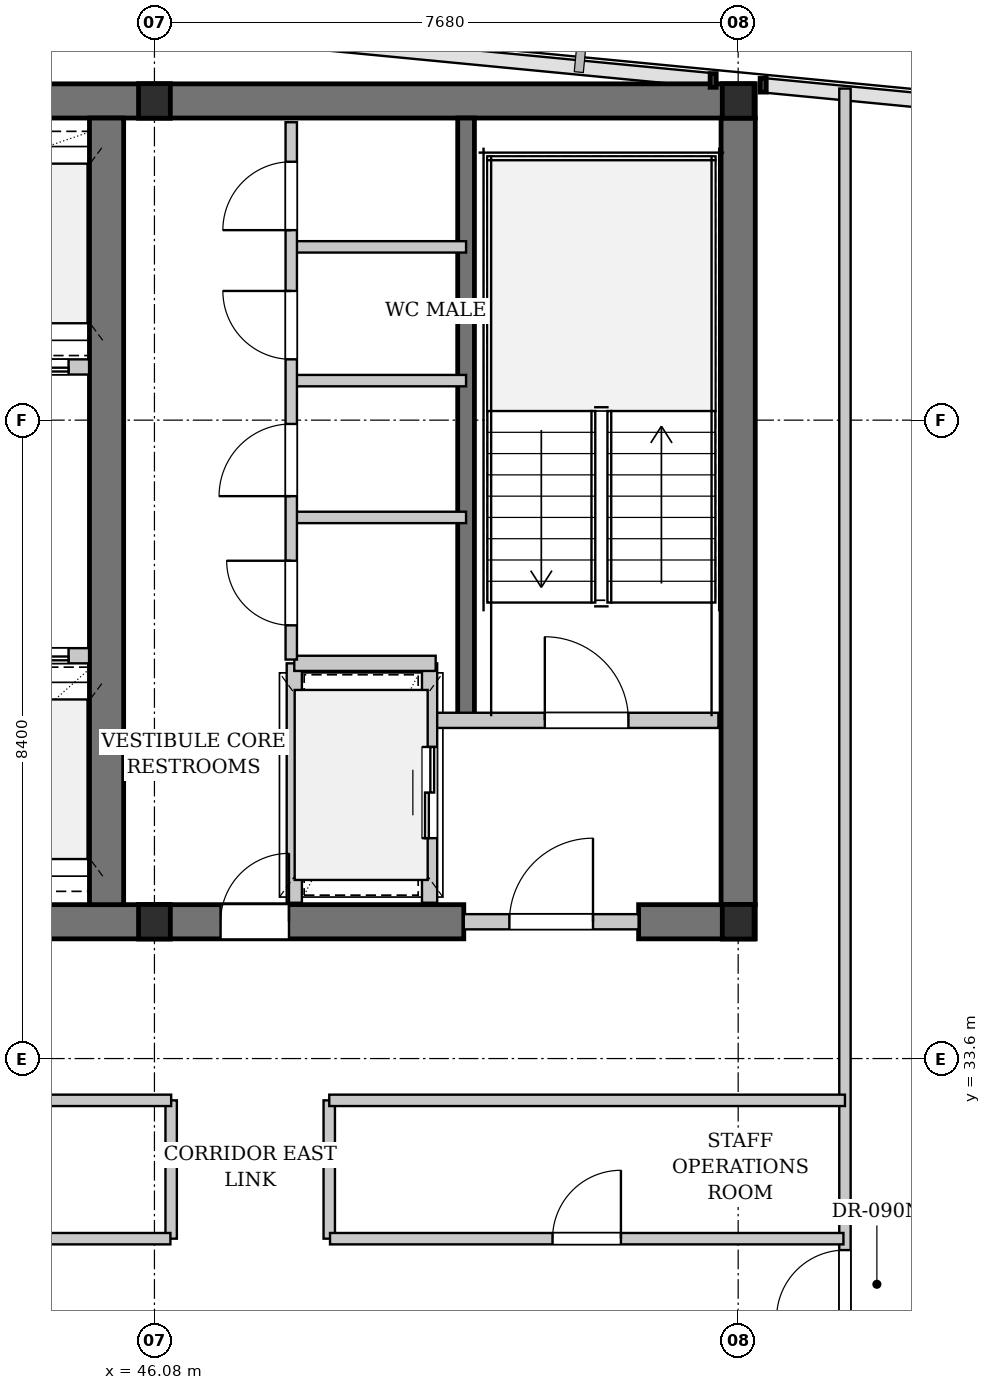
"""IFC4 building model, lengths in metres.
Left out: names, types, materials, properties, quantities, classifications, styles, units other than length and angle.
Written with IfcOpenShell. Run it as: python <this file> out.ifc"""

import sys

from ifc_helpers import new_model, si_unit, direction, frame, frame_2d, origin, origin_2d, place, context, subcontext, project, spatial, rectangle, i_section, extrude, element, fill, save


model = new_model("IFC4")
c1 = context("Model", 3, precision=1e-05, world=origin(), true_north=direction((0.0, 1.0)))
c2 = subcontext(c1, "Body", "Model", "MODEL_VIEW")
j1 = project(units=[si_unit("LENGTHUNIT", "METRE"), si_unit("PLANEANGLEUNIT", "RADIAN")], contexts=[c1])
p1 = place(None, origin())
s1 = spatial("IfcSite", under=j1, at=p1, CompositionType="ELEMENT")
p2 = place(p1, origin())
s2 = spatial("IfcBuilding", under=s1, at=p2, CompositionType="ELEMENT")
p3 = place(p2, frame((0.0, 0.0, 178.7)))
s3 = spatial("IfcBuildingStorey", under=s2, at=p3, CompositionType="ELEMENT", Elevation=178.7)
p4 = place(p3, frame((22.815, 46.2, 0.0), z_axis=(0.0, 0.0, 1.0), x_axis=(1.0, 0.0, 0.0)))
e1 = element("IfcWall", 1, at=p4, inside=s3, PredefinedType="SHEAR", context=c2, shape_type="SweptSolid", body=[
    extrude(rectangle(XDim=31.17, YDim=0.45, at=frame_2d((15.585, 0.0))), origin(), (0.0, 0.0, 1.0), 3.08),
])
p5 = place(p3, frame((42.1, 35.4, 0.0), z_axis=(0.0, 0.0, 1.0), x_axis=(1.0, 0.0, 0.0)))
e2 = element("IfcWall", 2, at=p5, inside=s3, PredefinedType="SHEAR", context=c2, shape_type="SweptSolid", body=[
    extrude(rectangle(XDim=8.05, YDim=0.45, at=frame_2d((4.025, 0.0))), origin(), (0.0, 0.0, 1.0), 3.08),
])
p6 = place(p5, frame((4.85, 0.0, 0.0)))
e3 = element("IfcOpeningElement", 3, at=p6, cuts=e2, PredefinedType="OPENING", context=c2, shape_type="SweptSolid", body=[
    extrude(rectangle(XDim=0.9, YDim=2.15, at=frame_2d((0.45, 1.075))), frame((0.0, 0.235, 0.0), z_axis=(0.0, -1.0, 0.0), x_axis=(1.0, 0.0, 0.0)), (0.0, 0.0, 1.0), 0.47),
])
p7 = place(p3, frame((52.45, 35.4, 0.0), z_axis=(0.0, 0.0, 1.0), x_axis=(1.0, 0.0, 0.0)))
e4 = element("IfcWall", 4, at=p7, inside=s3, PredefinedType="SHEAR", context=c2, shape_type="SweptSolid", body=[
    extrude(rectangle(XDim=1.535, YDim=0.45, at=frame_2d((0.768, 0.0))), origin(), (0.0, 0.0, 1.0), 3.08),
])
for number, where, z_axis, x_axis in (
    (5, (45.45, 35.625, 0.0), (0.0, 0.0, 1.0), (0.0, 1.0, 0.0)),
    (6, (53.76, 35.625, 0.0), (0.0, 0.0, 1.0), (0.0, 1.0, 0.0)),
):
    element("IfcWall", number, at=place(p3, frame(where, z_axis=z_axis, x_axis=x_axis)), inside=s3, PredefinedType="SHEAR", context=c2, shape_type="SweptSolid", body=[
        extrude(rectangle(XDim=10.35, YDim=0.45, at=frame_2d((5.175, 0.0))), origin(), (0.0, 0.0, 1.0), 3.08),
    ])
p8 = place(p3, frame((50.18, 38.05, 0.0), z_axis=(0.0, 0.0, 1.0), x_axis=(0.0, 1.0, 0.0)))
e7 = element("IfcWall", 7, at=p8, inside=s3, PredefinedType="SHEAR", context=c2, shape_type="SweptSolid", body=[
    extrude(rectangle(XDim=7.925, YDim=0.22, at=frame_2d((3.962, 0.0))), origin(), (0.0, 0.0, 1.0), 3.08),
])
for number, where, z_axis, x_axis in (
    (8, (46.08, 35.4, 0.0), (0.0, 0.0, 1.0), (1.0, 0.0, 0.0)),
    (9, (46.08, 46.2, 0.0), (0.0, 0.0, 1.0), (1.0, 0.0, 0.0)),
    (10, (53.76, 35.4, 0.0), (0.0, 0.0, 1.0), (1.0, 0.0, 0.0)),
    (11, (53.76, 46.2, 0.0), (0.0, 0.0, 1.0), (1.0, 0.0, 0.0)),
):
    element("IfcColumn", number, at=place(p3, frame(where, z_axis=z_axis, x_axis=x_axis)), inside=s3, PredefinedType="COLUMN", context=c2, shape_type="SweptSolid", body=[
        extrude(i_section(OverallWidth=0.418, OverallDepth=0.455, WebThickness=0.042, FlangeThickness=0.068, FilletRadius=0.015, at=origin_2d()), origin(), (0.0, 0.0, 1.0), 3.3),
    ])
p9 = place(p3, frame((41.85, 38.9, 0.0), z_axis=(0.0, 0.0, 1.0), x_axis=(1.0, 0.0, 0.0)))
e12 = element("IfcWall", 12, at=p9, inside=s3, PredefinedType="PARTITIONING", context=c2, shape_type="SweptSolid", body=[
    extrude(rectangle(XDim=3.37, YDim=0.2, at=frame_2d((1.685, 0.0))), origin(), (0.0, 0.0, 1.0), 3.08),
])
p10 = place(p9, frame((0.4, 0.0, 0.0)))
e13 = element("IfcOpeningElement", 13, at=p10, cuts=e12, PredefinedType="OPENING", context=c2, shape_type="SweptSolid", body=[
    extrude(rectangle(XDim=1.0, YDim=2.2, at=frame_2d((0.5, 1.1))), frame((0.0, 0.11, 0.0), z_axis=(0.0, -1.0, 0.0), x_axis=(1.0, 0.0, 0.0)), (0.0, 0.0, 1.0), 0.22),
])
p11 = place(p9, frame((2.1, 0.0, 0.0)))
e14 = element("IfcOpeningElement", 14, at=p11, cuts=e12, PredefinedType="OPENING", context=c2, shape_type="SweptSolid", body=[
    extrude(rectangle(XDim=1.0, YDim=2.2, at=frame_2d((0.5, 1.1))), frame((0.0, 0.11, 0.0), z_axis=(0.0, -1.0, 0.0), x_axis=(1.0, 0.0, 0.0)), (0.0, 0.0, 1.0), 0.22),
])
p12 = place(p3, frame((41.85, 42.7, 0.0), z_axis=(0.0, 0.0, 1.0), x_axis=(1.0, 0.0, 0.0)))
e15 = element("IfcWall", 15, at=p12, inside=s3, PredefinedType="PARTITIONING", context=c2, shape_type="SweptSolid", body=[
    extrude(rectangle(XDim=3.37, YDim=0.2, at=frame_2d((1.685, 0.0))), origin(), (0.0, 0.0, 1.0), 3.08),
])
p13 = place(p12, frame((0.4, 0.0, 0.0)))
e16 = element("IfcOpeningElement", 16, at=p13, cuts=e15, PredefinedType="OPENING", context=c2, shape_type="SweptSolid", body=[
    extrude(rectangle(XDim=1.0, YDim=2.2, at=frame_2d((0.5, 1.1))), frame((0.0, 0.11, 0.0), z_axis=(0.0, -1.0, 0.0), x_axis=(1.0, 0.0, 0.0)), (0.0, 0.0, 1.0), 0.22),
])
p14 = place(p12, frame((2.1, 0.0, 0.0)))
e17 = element("IfcOpeningElement", 17, at=p14, cuts=e15, PredefinedType="OPENING", context=c2, shape_type="SweptSolid", body=[
    extrude(rectangle(XDim=1.0, YDim=2.2, at=frame_2d((0.5, 1.1))), frame((0.0, 0.11, 0.0), z_axis=(0.0, -1.0, 0.0), x_axis=(1.0, 0.0, 0.0)), (0.0, 0.0, 1.0), 0.22),
])
p15 = place(p3, frame((49.78, 38.05, 0.0), z_axis=(0.0, 0.0, 1.0), x_axis=(1.0, 0.0, 0.0)))
e18 = element("IfcWall", 18, at=p15, inside=s3, PredefinedType="PARTITIONING", context=c2, shape_type="SweptSolid", body=[
    extrude(rectangle(XDim=3.72, YDim=0.2, at=frame_2d((1.86, 0.0))), origin(), (0.0, 0.0, 1.0), 3.08),
])
p16 = place(p15, frame((1.436, 0.0, 0.0)))
e19 = element("IfcOpeningElement", 19, at=p16, cuts=e18, PredefinedType="OPENING", context=c2, shape_type="SweptSolid", body=[
    extrude(rectangle(XDim=1.1, YDim=2.15, at=frame_2d((0.55, 1.075))), frame((0.0, 0.11, 0.0), z_axis=(0.0, -1.0, 0.0), x_axis=(1.0, 0.0, 0.0)), (0.0, 0.0, 1.0), 0.22),
])
p17 = place(p3, frame((50.15, 35.4, 0.0), z_axis=(0.0, 0.0, 1.0), x_axis=(1.0, 0.0, 0.0)))
e20 = element("IfcWall", 20, at=p17, inside=s3, PredefinedType="PARTITIONING", context=c2, shape_type="SweptSolid", body=[
    extrude(rectangle(XDim=2.3, YDim=0.2, at=frame_2d((1.15, 0.0))), origin(), (0.0, 0.0, 1.0), 2.475),
])
p18 = place(p17, frame((0.6, 0.0, 0.0)))
e21 = element("IfcOpeningElement", 21, at=p18, cuts=e20, PredefinedType="OPENING", context=c2, shape_type="SweptSolid", body=[
    extrude(rectangle(XDim=1.1, YDim=2.15, at=frame_2d((0.55, 1.075))), frame((0.0, 0.11, 0.0), z_axis=(0.0, -1.0, 0.0), x_axis=(1.0, 0.0, 0.0)), (0.0, 0.0, 1.0), 0.22),
])
p19 = place(p3, frame((49.7, 35.65, 0.0), z_axis=(0.0, 0.0, 1.0), x_axis=(0.0, 1.0, 0.0)))
e22 = element("IfcWall", 22, at=p19, inside=s3, PredefinedType="PARTITIONING", context=c2, shape_type="SweptSolid", body=[
    extrude(rectangle(XDim=3.15, YDim=0.2, at=frame_2d((1.575, 0.0))), origin(), (0.0, 0.0, 1.0), 3.08),
])
p20 = place(p19, frame((0.85, 0.0, 0.0)))
e23 = element("IfcOpeningElement", 23, at=p20, cuts=e22, PredefinedType="OPENING", context=c2, shape_type="SweptSolid", body=[
    extrude(rectangle(XDim=1.2, YDim=2.2, at=frame_2d((0.6, 1.1))), frame((0.0, 0.11, 0.0), z_axis=(0.0, -1.0, 0.0), x_axis=(1.0, 0.0, 0.0)), (0.0, 0.0, 1.0), 0.22),
])
p21 = place(p3, frame((47.92, 35.65, 0.0), z_axis=(0.0, 0.0, 1.0), x_axis=(0.0, 1.0, 0.0)))
e24 = element("IfcWall", 24, at=p21, inside=s3, PredefinedType="PARTITIONING", context=c2, shape_type="SweptSolid", body=[
    extrude(rectangle(XDim=3.15, YDim=0.2, at=frame_2d((1.575, 0.0))), origin(), (0.0, 0.0, 1.0), 3.08),
])
p22 = place(p3, frame((47.92, 38.8, 0.0), z_axis=(0.0, 0.0, 1.0), x_axis=(1.0, 0.0, 0.0)))
e25 = element("IfcWall", 25, at=p22, inside=s3, PredefinedType="PARTITIONING", context=c2, shape_type="SweptSolid", body=[
    extrude(rectangle(XDim=1.86, YDim=0.2, at=frame_2d((0.93, 0.0))), origin(), (0.0, 0.0, 1.0), 3.08),
])
for number, where, z_axis, x_axis in (
    (26, (47.88, 40.72, 0.0), (0.0, 0.0, 1.0), (1.0, 0.0, 0.0)),
    (27, (47.88, 42.52, 0.0), (0.0, 0.0, 1.0), (1.0, 0.0, 0.0)),
    (28, (47.88, 44.28, 0.0), (0.0, 0.0, 1.0), (1.0, 0.0, 0.0)),
):
    element("IfcWall", number, at=place(p3, frame(where, z_axis=z_axis, x_axis=x_axis)), inside=s3, PredefinedType="PARTITIONING", context=c2, shape_type="SweptSolid", body=[
        extrude(rectangle(XDim=2.3, YDim=0.15, at=frame_2d((1.15, 0.0))), origin(), (0.0, 0.0, 1.0), 3.08),
    ])
p23 = place(p3, frame((47.88, 38.85, 0.0), z_axis=(0.0, 0.0, 1.0), x_axis=(0.0, 1.0, 0.0)))
e29 = element("IfcWall", 29, at=p23, inside=s3, PredefinedType="PARTITIONING", context=c2, shape_type="SweptSolid", body=[
    extrude(rectangle(XDim=7.07, YDim=0.15, at=frame_2d((3.535, 0.0))), origin(), (0.0, 0.0, 1.0), 3.08),
])
p24 = place(p23, frame((0.45, 0.0, 0.0)))
e30 = element("IfcOpeningElement", 30, at=p24, cuts=e29, PredefinedType="OPENING", context=c2, shape_type="SweptSolid", body=[
    extrude(rectangle(XDim=0.85, YDim=2.15, at=frame_2d((0.425, 1.075))), frame((0.0, 0.085, 0.0), z_axis=(0.0, -1.0, 0.0), x_axis=(1.0, 0.0, 0.0)), (0.0, 0.0, 1.0), 0.17),
])
p25 = place(p23, frame((2.15, 0.0, 0.0)))
e31 = element("IfcOpeningElement", 31, at=p25, cuts=e29, PredefinedType="OPENING", context=c2, shape_type="SweptSolid", body=[
    extrude(rectangle(XDim=0.95, YDim=2.15, at=frame_2d((0.475, 1.075))), frame((0.0, 0.085, 0.0), z_axis=(0.0, -1.0, 0.0), x_axis=(1.0, 0.0, 0.0)), (0.0, 0.0, 1.0), 0.17),
])
p26 = place(p23, frame((3.95, 0.0, 0.0)))
e32 = element("IfcOpeningElement", 32, at=p26, cuts=e29, PredefinedType="OPENING", context=c2, shape_type="SweptSolid", body=[
    extrude(rectangle(XDim=0.9, YDim=2.15, at=frame_2d((0.45, 1.075))), frame((0.0, 0.085, 0.0), z_axis=(0.0, -1.0, 0.0), x_axis=(1.0, 0.0, 0.0)), (0.0, 0.0, 1.0), 0.17),
])
p27 = place(p23, frame((5.65, 0.0, 0.0)))
e33 = element("IfcOpeningElement", 33, at=p27, cuts=e29, PredefinedType="OPENING", context=c2, shape_type="SweptSolid", body=[
    extrude(rectangle(XDim=0.9, YDim=2.15, at=frame_2d((0.45, 1.075))), frame((0.0, 0.085, 0.0), z_axis=(0.0, -1.0, 0.0), x_axis=(1.0, 0.0, 0.0)), (0.0, 0.0, 1.0), 0.17),
])
p28 = place(p3, frame((55.165, 29.15, 0.0), z_axis=(0.0, 0.0, 1.0), x_axis=(0.0, 1.0, 0.0)))
e34 = element("IfcWall", 34, at=p28, inside=s3, PredefinedType="PARTITIONING", context=c2, shape_type="SweptSolid", body=[
    extrude(rectangle(XDim=17.213, YDim=0.15, at=frame_2d((8.606, 0.0))), origin(), (0.0, 0.0, 1.0), 3.08),
])
p29 = place(p28, frame((1.03, 0.0, 0.0)))
e35 = element("IfcOpeningElement", 35, at=p29, cuts=e34, PredefinedType="OPENING", context=c2, shape_type="SweptSolid", body=[
    extrude(rectangle(XDim=0.9, YDim=2.15, at=frame_2d((0.45, 1.075))), frame((0.0, 0.085, 0.0), z_axis=(0.0, -1.0, 0.0), x_axis=(1.0, 0.0, 0.0)), (0.0, 0.0, 1.0), 0.17),
])
p30 = place(p3, frame((46.3, 31.23, 0.0), z_axis=(0.0, 0.0, 1.0), x_axis=(0.0, 1.0, 0.0)))
e36 = element("IfcWall", 36, at=p30, inside=s3, PredefinedType="PARTITIONING", context=c2, shape_type="SweptSolid", body=[
    extrude(rectangle(XDim=1.82, YDim=0.15, at=frame_2d((0.91, 0.0))), origin(), (0.0, 0.0, 1.0), 2.475),
])
p31 = place(p3, frame((48.38, 31.23, 0.0), z_axis=(0.0, 0.0, 1.0), x_axis=(0.0, 1.0, 0.0)))
e37 = element("IfcWall", 37, at=p31, inside=s3, PredefinedType="PARTITIONING", context=c2, shape_type="SweptSolid", body=[
    extrude(rectangle(XDim=1.82, YDim=0.15, at=frame_2d((0.91, 0.0))), origin(), (0.0, 0.0, 1.0), 3.08),
])
p32 = place(p3, frame((30.58, 33.05, 0.0), z_axis=(0.0, 0.0, 1.0), x_axis=(1.0, 0.0, 0.0)))
e38 = element("IfcWall", 38, at=p32, inside=s3, PredefinedType="PARTITIONING", context=c2, shape_type="SweptSolid", body=[
    extrude(rectangle(XDim=15.72, YDim=0.15, at=frame_2d((7.86, 0.0))), origin(), (0.0, 0.0, 1.0), 3.08),
])
p33 = place(p3, frame((48.38, 33.05, 0.0), z_axis=(0.0, 0.0, 1.0), x_axis=(1.0, 0.0, 0.0)))
e39 = element("IfcWall", 39, at=p33, inside=s3, PredefinedType="PARTITIONING", context=c2, shape_type="SweptSolid", body=[
    extrude(rectangle(XDim=6.785, YDim=0.15, at=frame_2d((3.393, 0.0))), origin(), (0.0, 0.0, 1.0), 3.08),
])
p34 = place(p3, frame((30.59, 31.23, 0.0), z_axis=(0.0, 0.0, 1.0), x_axis=(1.0, 0.0, 0.0)))
e40 = element("IfcWall", 40, at=p34, inside=s3, PredefinedType="PARTITIONING", context=c2, shape_type="SweptSolid", body=[
    extrude(rectangle(XDim=15.7, YDim=0.15, at=frame_2d((7.85, 0.0))), origin(), (0.0, 0.0, 1.0), 3.08),
])
p35 = place(p34, frame((5.987, 0.0, 0.0)))
e41 = element("IfcOpeningElement", 41, at=p35, cuts=e40, PredefinedType="OPENING", context=c2, shape_type="SweptSolid", body=[
    extrude(rectangle(XDim=0.9, YDim=2.15, at=frame_2d((0.45, 1.075))), frame((0.0, 0.085, 0.0), z_axis=(0.0, -1.0, 0.0), x_axis=(1.0, 0.0, 0.0)), (0.0, 0.0, 1.0), 0.17),
])
p36 = place(p34, frame((12.031, 0.0, 0.0)))
e42 = element("IfcOpeningElement", 42, at=p36, cuts=e40, PredefinedType="OPENING", context=c2, shape_type="SweptSolid", body=[
    extrude(rectangle(XDim=0.9, YDim=2.15, at=frame_2d((0.45, 1.075))), frame((0.0, 0.085, 0.0), z_axis=(0.0, -1.0, 0.0), x_axis=(1.0, 0.0, 0.0)), (0.0, 0.0, 1.0), 0.17),
])
p37 = place(p3, frame((48.39, 31.23, 0.0), z_axis=(0.0, 0.0, 1.0), x_axis=(1.0, 0.0, 0.0)))
e43 = element("IfcWall", 43, at=p37, inside=s3, PredefinedType="PARTITIONING", context=c2, shape_type="SweptSolid", body=[
    extrude(rectangle(XDim=6.755, YDim=0.15, at=frame_2d((3.377, 0.0))), origin(), (0.0, 0.0, 1.0), 3.08),
])
p38 = place(p37, frame((2.927, 0.0, 0.0)))
e44 = element("IfcOpeningElement", 44, at=p38, cuts=e43, PredefinedType="OPENING", context=c2, shape_type="SweptSolid", body=[
    extrude(rectangle(XDim=0.9, YDim=2.15, at=frame_2d((0.45, 1.075))), frame((0.0, 0.085, 0.0), z_axis=(0.0, -1.0, 0.0), x_axis=(1.0, 0.0, 0.0)), (0.0, 0.0, 1.0), 0.17),
])
p39 = place(p11, origin())
e45 = element("IfcDoor", 45, at=p39, inside=s3, OperationType="DOUBLE_DOOR_SLIDING", PredefinedType="DOOR", context=c2, shape_type="SweptSolid", body=[
    extrude(rectangle(XDim=1.0, YDim=2.2, at=frame_2d((0.5, 1.1))), frame((0.0, 0.025, 0.0), z_axis=(0.0, -1.0, 0.0), x_axis=(1.0, 0.0, 0.0)), (0.0, 0.0, 1.0), 0.05),
])
fill(e14, e45)
p40 = place(p14, origin())
e46 = element("IfcDoor", 46, at=p40, inside=s3, OperationType="DOUBLE_DOOR_SLIDING", PredefinedType="DOOR", context=c2, shape_type="SweptSolid", body=[
    extrude(rectangle(XDim=1.0, YDim=2.2, at=frame_2d((0.5, 1.1))), frame((0.0, 0.025, 0.0), z_axis=(0.0, -1.0, 0.0), x_axis=(1.0, 0.0, 0.0)), (0.0, 0.0, 1.0), 0.05),
])
fill(e17, e46)
p41 = place(p16, origin())
e47 = element("IfcDoor", 47, at=p41, inside=s3, OperationType="SINGLE_SWING_LEFT", PredefinedType="DOOR", context=c2, shape_type="SweptSolid", body=[
    extrude(rectangle(XDim=1.1, YDim=2.15, at=frame_2d((0.55, 1.075))), frame((0.0, 0.025, 0.0), z_axis=(0.0, -1.0, 0.0), x_axis=(1.0, 0.0, 0.0)), (0.0, 0.0, 1.0), 0.05),
])
fill(e19, e47)
p42 = place(p18, origin())
e48 = element("IfcDoor", 48, at=p42, inside=s3, OperationType="SINGLE_SWING_RIGHT", PredefinedType="DOOR", context=c2, shape_type="SweptSolid", body=[
    extrude(rectangle(XDim=1.1, YDim=2.15, at=frame_2d((0.55, 1.075))), frame((0.0, 0.025, 0.0), z_axis=(0.0, -1.0, 0.0), x_axis=(1.0, 0.0, 0.0)), (0.0, 0.0, 1.0), 0.05),
])
fill(e21, e48)
p43 = place(p20, origin())
e49 = element("IfcDoor", 49, at=p43, inside=s3, OperationType="DOUBLE_DOOR_SLIDING", PredefinedType="DOOR", context=c2, shape_type="SweptSolid", body=[
    extrude(rectangle(XDim=1.2, YDim=2.2, at=frame_2d((0.6, 1.1))), frame((0.0, 0.025, 0.0), z_axis=(0.0, -1.0, 0.0), x_axis=(1.0, 0.0, 0.0)), (0.0, 0.0, 1.0), 0.05),
])
fill(e23, e49)
p44 = place(p24, origin())
e50 = element("IfcDoor", 50, at=p44, inside=s3, OperationType="SINGLE_SWING_RIGHT", PredefinedType="DOOR", context=c2, shape_type="SweptSolid", body=[
    extrude(rectangle(XDim=0.85, YDim=2.15, at=frame_2d((0.425, 1.075))), frame((0.0, 0.025, 0.0), z_axis=(0.0, -1.0, 0.0), x_axis=(1.0, 0.0, 0.0)), (0.0, 0.0, 1.0), 0.05),
])
fill(e30, e50)
p45 = place(p25, origin())
e51 = element("IfcDoor", 51, at=p45, inside=s3, OperationType="SINGLE_SWING_LEFT", PredefinedType="DOOR", context=c2, shape_type="SweptSolid", body=[
    extrude(rectangle(XDim=0.95, YDim=2.15, at=frame_2d((0.475, 1.075))), frame((0.0, 0.025, 0.0), z_axis=(0.0, -1.0, 0.0), x_axis=(1.0, 0.0, 0.0)), (0.0, 0.0, 1.0), 0.05),
])
fill(e31, e51)
p46 = place(p26, origin())
e52 = element("IfcDoor", 52, at=p46, inside=s3, OperationType="SINGLE_SWING_RIGHT", PredefinedType="DOOR", context=c2, shape_type="SweptSolid", body=[
    extrude(rectangle(XDim=0.9, YDim=2.15, at=frame_2d((0.45, 1.075))), frame((0.0, 0.025, 0.0), z_axis=(0.0, -1.0, 0.0), x_axis=(1.0, 0.0, 0.0)), (0.0, 0.0, 1.0), 0.05),
])
fill(e32, e52)
p47 = place(p27, origin())
e53 = element("IfcDoor", 53, at=p47, inside=s3, OperationType="SINGLE_SWING_LEFT", PredefinedType="DOOR", context=c2, shape_type="SweptSolid", body=[
    extrude(rectangle(XDim=0.9, YDim=2.15, at=frame_2d((0.45, 1.075))), frame((0.0, 0.025, 0.0), z_axis=(0.0, -1.0, 0.0), x_axis=(1.0, 0.0, 0.0)), (0.0, 0.0, 1.0), 0.05),
])
fill(e33, e53)
p48 = place(p29, origin())
e54 = element("IfcDoor", 54, at=p48, inside=s3, OperationType="SINGLE_SWING_LEFT", PredefinedType="DOOR", context=c2, shape_type="SweptSolid", body=[
    extrude(rectangle(XDim=0.9, YDim=2.15, at=frame_2d((0.45, 1.075))), frame((0.0, 0.025, 0.0), z_axis=(0.0, -1.0, 0.0), x_axis=(1.0, 0.0, 0.0)), (0.0, 0.0, 1.0), 0.05),
])
fill(e35, e54)
p49 = place(p38, origin())
e55 = element("IfcDoor", 55, at=p49, inside=s3, OperationType="SINGLE_SWING_RIGHT", PredefinedType="DOOR", context=c2, shape_type="SweptSolid", body=[
    extrude(rectangle(XDim=0.9, YDim=2.15, at=frame_2d((0.45, 1.075))), frame((0.0, 0.025, 0.0), z_axis=(0.0, -1.0, 0.0), x_axis=(1.0, 0.0, 0.0)), (0.0, 0.0, 1.0), 0.05),
])
fill(e44, e55)
p50 = place(p6, origin())
e56 = element("IfcDoor", 56, at=p50, inside=s3, OperationType="SINGLE_SWING_RIGHT", PredefinedType="DOOR", context=c2, shape_type="SweptSolid", body=[
    extrude(rectangle(XDim=0.9, YDim=2.15, at=frame_2d((0.45, 1.075))), frame((0.0, 0.025, 0.0), z_axis=(0.0, -1.0, 0.0), x_axis=(1.0, 0.0, 0.0)), (0.0, 0.0, 1.0), 0.05),
])
fill(e3, e56)
save(model, sys.argv[1])
